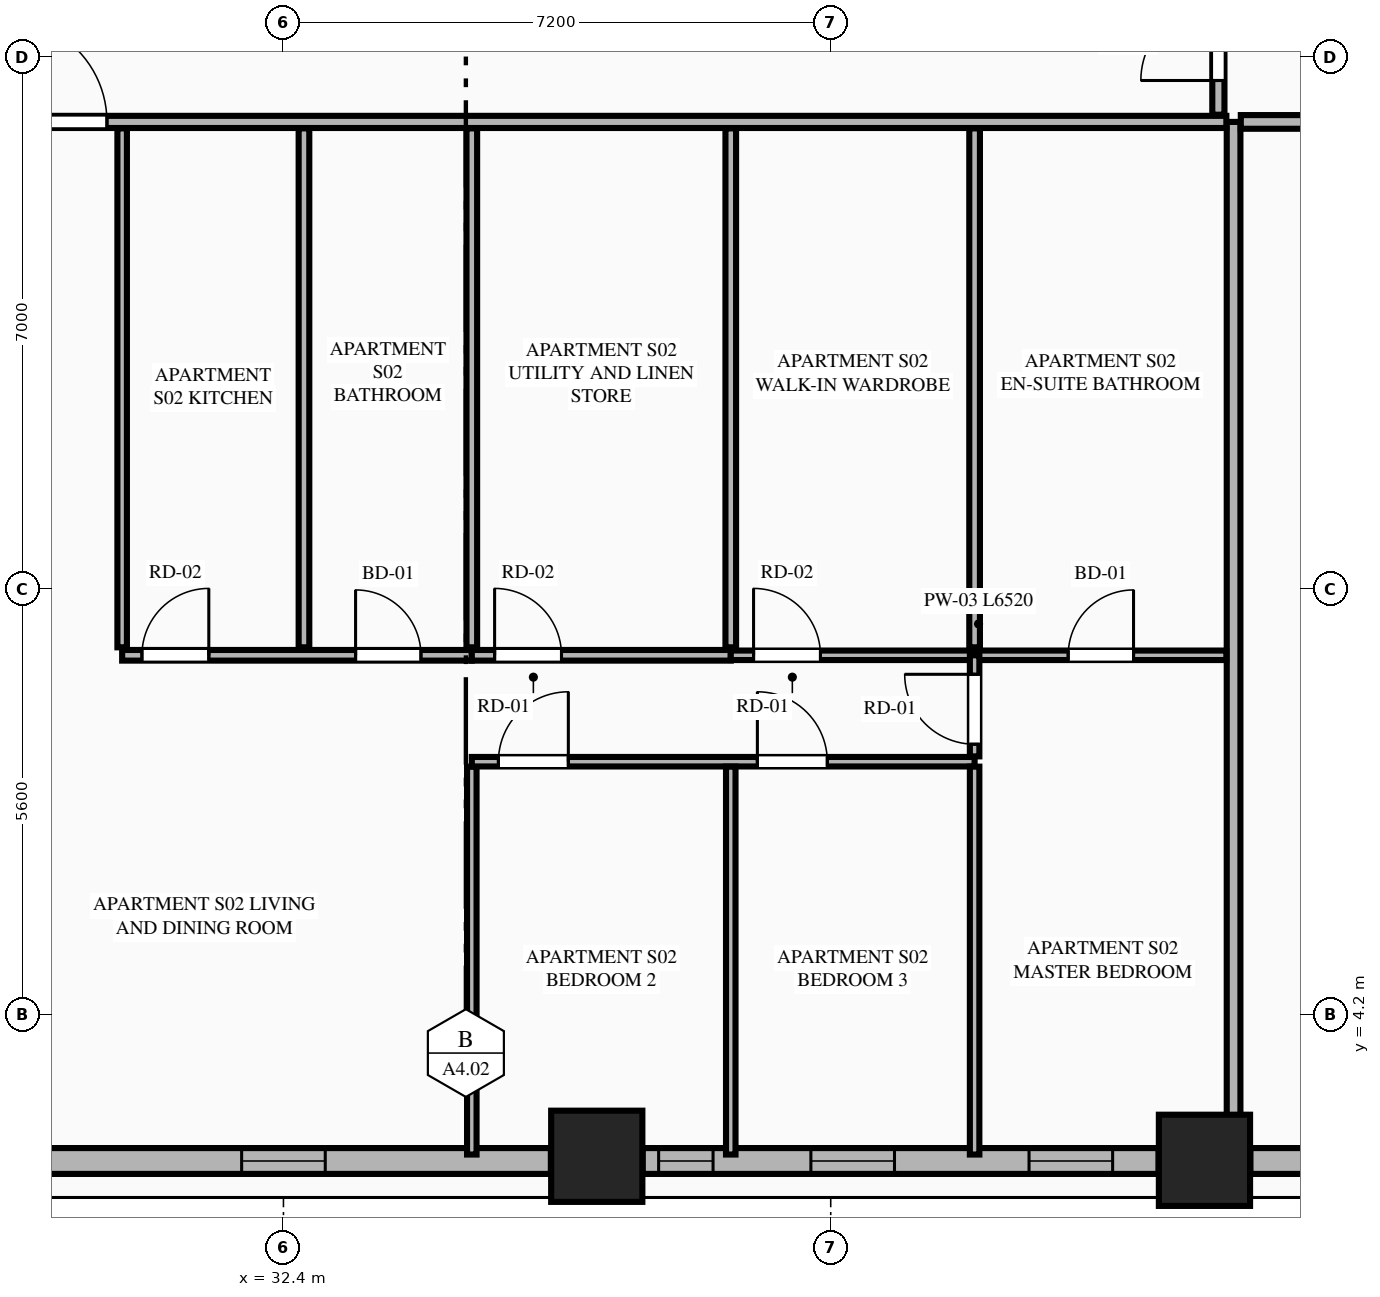
"""IFC4 building model, lengths in metres.
Left out: names, types, materials, properties, quantities, classifications, styles, units other than length and angle.
Written with IfcOpenShell. Run it as: python <this file> out.ifc"""

import sys

from ifc_helpers import new_model, si_unit, direction, frame, frame_2d, origin, origin_2d, place, context, subcontext, project, spatial, rectangle, extrude, element, fill, save


model = new_model("IFC4")
c1 = context("Model", 3, precision=1e-05, world=origin(), true_north=direction((0.0, 1.0)))
c2 = subcontext(c1, "Body", "Model", "MODEL_VIEW")
j1 = project(units=[si_unit("LENGTHUNIT", "METRE"), si_unit("PLANEANGLEUNIT", "RADIAN")], contexts=[c1])
p1 = place(None, origin())
s1 = spatial("IfcSite", under=j1, at=p1, CompositionType="ELEMENT")
p2 = place(p1, origin())
s2 = spatial("IfcBuilding", under=s1, at=p2, CompositionType="ELEMENT")
p3 = place(p2, frame((0.0, 0.0, 35.55)))
s3 = spatial("IfcBuildingStorey", under=s2, at=p3, CompositionType="ELEMENT", Elevation=35.55)
for number, where, z_axis, x_axis in (
    (1, (36.522, 2.342, 0.0), (0.0, 0.0, 1.0), (1.0, 0.0, 0.0)),
    (2, (44.517, 2.289, 0.0), (0.0, 0.0, 1.0), (1.0, 0.0, 0.0)),
):
    element("IfcColumn", number, at=place(p3, frame(where, z_axis=z_axis, x_axis=x_axis)), inside=s3, PredefinedType="COLUMN", context=c2, shape_type="SweptSolid", body=[
        extrude(rectangle(XDim=1.2, YDim=1.2, at=origin_2d()), origin(), (0.0, 0.0, 1.0), 3.55),
    ])
p4 = place(p3, frame((28.882, 2.28, 0.0), z_axis=(0.0, 0.0, 1.0), x_axis=(1.0, 0.0, 0.0)))
e3 = element("IfcWall", 3, at=p4, inside=s3, PredefinedType="STANDARD", context=c2, shape_type="SweptSolid", body=[
    extrude(rectangle(XDim=7.036, YDim=0.34, at=frame_2d((3.518, 0.0))), origin(), (0.0, 0.0, 1.0), 2.787),
])
p5 = place(p4, frame((2.968, 0.0, 0.75)))
e4 = element("IfcOpeningElement", 4, at=p5, cuts=e3, PredefinedType="OPENING", context=c2, shape_type="SweptSolid", body=[
    extrude(rectangle(XDim=1.1, YDim=1.887, at=frame_2d((0.55, 0.943))), frame((0.0, 0.18, 0.0), z_axis=(0.0, -1.0, 0.0), x_axis=(1.0, 0.0, 0.0)), (0.0, 0.0, 1.0), 0.36),
])
p6 = place(p3, frame((37.126, 2.28, 0.0), z_axis=(0.0, 0.0, 1.0), x_axis=(1.0, 0.0, 0.0)))
e5 = element("IfcWall", 5, at=p6, inside=s3, PredefinedType="STANDARD", context=c2, shape_type="SweptSolid", body=[
    extrude(rectangle(XDim=6.787, YDim=0.34, at=frame_2d((3.394, 0.0))), origin(), (0.0, 0.0, 1.0), 2.787),
])
p7 = place(p6, frame((2.213, 0.0, 0.75)))
e6 = element("IfcOpeningElement", 6, at=p7, cuts=e5, PredefinedType="OPENING", context=c2, shape_type="SweptSolid", body=[
    extrude(rectangle(XDim=1.1, YDim=1.887, at=frame_2d((0.55, 0.943))), frame((0.0, 0.18, 0.0), z_axis=(0.0, -1.0, 0.0), x_axis=(1.0, 0.0, 0.0)), (0.0, 0.0, 1.0), 0.36),
])
p8 = place(p6, frame((5.083, 0.0, 0.75)))
e7 = element("IfcOpeningElement", 7, at=p8, cuts=e5, PredefinedType="OPENING", context=c2, shape_type="SweptSolid", body=[
    extrude(rectangle(XDim=1.1, YDim=1.887, at=frame_2d((0.55, 0.943))), frame((0.0, 0.18, 0.0), z_axis=(0.0, -1.0, 0.0), x_axis=(1.0, 0.0, 0.0)), (0.0, 0.0, 1.0), 0.36),
])
p9 = place(p6, frame((0.21, 0.0, 0.75)))
e8 = element("IfcOpeningElement", 8, at=p9, cuts=e5, PredefinedType="OPENING", context=c2, shape_type="SweptSolid", body=[
    extrude(rectangle(XDim=0.716, YDim=1.887, at=frame_2d((0.358, 0.943))), frame((0.0, 0.18, 0.0), z_axis=(0.0, -1.0, 0.0), x_axis=(1.0, 0.0, 0.0)), (0.0, 0.0, 1.0), 0.36),
])
p10 = place(p3, frame((45.121, 2.28, 0.0), z_axis=(0.0, 0.0, 1.0), x_axis=(1.0, 0.0, 0.0)))
e9 = element("IfcWall", 9, at=p10, inside=s3, PredefinedType="STANDARD", context=c2, shape_type="SweptSolid", body=[
    extrude(rectangle(XDim=1.245, YDim=0.34, at=frame_2d((0.623, 0.0))), origin(), (0.0, 0.0, 1.0), 3.33),
])
p11 = place(p3, frame((44.9, 2.455, 0.0), z_axis=(0.0, 0.0, 1.0), x_axis=(0.0, 1.0, 0.0)))
e10 = element("IfcWall", 10, at=p11, inside=s3, PredefinedType="PARTITIONING", context=c2, shape_type="SweptSolid", body=[
    extrude(rectangle(XDim=13.495, YDim=0.18, at=frame_2d((6.748, 0.0))), origin(), (0.0, 0.0, 1.0), 3.33),
])
p12 = place(p3, frame((28.373, 15.95, 0.0), z_axis=(0.0, 0.0, 1.0), x_axis=(1.0, 0.0, 0.0)))
e11 = element("IfcWall", 11, at=p12, inside=s3, PredefinedType="PARTITIONING", context=c2, shape_type="SweptSolid", body=[
    extrude(rectangle(XDim=16.432, YDim=0.16, at=frame_2d((8.216, 0.0))), origin(), (0.0, 0.0, 1.0), 3.33),
])
p13 = place(p12, frame((0.355, 0.0, 0.0)))
e12 = element("IfcOpeningElement", 12, at=p13, cuts=e11, PredefinedType="OPENING", context=c2, shape_type="SweptSolid", body=[
    extrude(rectangle(XDim=1.35, YDim=2.35, at=frame_2d((0.675, 1.175))), frame((0.0, 0.09, 0.0), z_axis=(0.0, -1.0, 0.0), x_axis=(1.0, 0.0, 0.0)), (0.0, 0.0, 1.0), 0.18),
])
p14 = place(p3, frame((30.278, 9.038, 0.0), z_axis=(0.0, 0.0, 1.0), x_axis=(0.0, 1.0, 0.0)))
e13 = element("IfcWall", 13, at=p14, inside=s3, PredefinedType="PARTITIONING", context=c2, shape_type="SweptSolid", body=[
    extrude(rectangle(XDim=6.827, YDim=0.125, at=frame_2d((3.414, 0.0))), origin(), (0.0, 0.0, 1.0), 3.33),
])
p15 = place(p3, frame((30.278, 8.933, 0.0), z_axis=(0.0, 0.0, 1.0), x_axis=(1.0, 0.0, 0.0)))
e14 = element("IfcWall", 14, at=p15, inside=s3, PredefinedType="PLUMBINGWALL", context=c2, shape_type="SweptSolid", body=[
    extrude(rectangle(XDim=4.6, YDim=0.14, at=frame_2d((2.3, 0.0))), origin(), (0.0, 0.0, 1.0), 3.33),
])
p16 = place(p15, frame((3.071, 0.0, 0.0)))
e15 = element("IfcOpeningElement", 15, at=p16, cuts=e14, PredefinedType="OPENING", context=c2, shape_type="SweptSolid", body=[
    extrude(rectangle(XDim=0.86, YDim=2.1, at=frame_2d((0.43, 1.05))), frame((0.0, 0.08, 0.0), z_axis=(0.0, -1.0, 0.0), x_axis=(1.0, 0.0, 0.0)), (0.0, 0.0, 1.0), 0.16),
])
p17 = place(p15, frame((0.26, 0.0, 0.0)))
e16 = element("IfcOpeningElement", 16, at=p17, cuts=e14, PredefinedType="OPENING", context=c2, shape_type="SweptSolid", body=[
    extrude(rectangle(XDim=0.88, YDim=2.15, at=frame_2d((0.44, 1.075))), frame((0.0, 0.08, 0.0), z_axis=(0.0, -1.0, 0.0), x_axis=(1.0, 0.0, 0.0)), (0.0, 0.0, 1.0), 0.16),
])
p18 = place(p3, frame((34.878, 8.933, 0.0), z_axis=(0.0, 0.0, 1.0), x_axis=(1.0, 0.0, 0.0)))
e17 = element("IfcWall", 17, at=p18, inside=s3, PredefinedType="PLUMBINGWALL", context=c2, shape_type="SweptSolid", body=[
    extrude(rectangle(XDim=3.407, YDim=0.14, at=frame_2d((1.704, 0.0))), origin(), (0.0, 0.0, 1.0), 3.33),
])
p19 = place(p18, frame((0.3, 0.0, 0.0)))
e18 = element("IfcOpeningElement", 18, at=p19, cuts=e17, PredefinedType="OPENING", context=c2, shape_type="SweptSolid", body=[
    extrude(rectangle(XDim=0.88, YDim=2.15, at=frame_2d((0.44, 1.075))), frame((0.0, 0.08, 0.0), z_axis=(0.0, -1.0, 0.0), x_axis=(1.0, 0.0, 0.0)), (0.0, 0.0, 1.0), 0.16),
])
p20 = place(p3, frame((38.285, 8.933, 0.0), z_axis=(0.0, 0.0, 1.0), x_axis=(1.0, 0.0, 0.0)))
e19 = element("IfcWall", 19, at=p20, inside=s3, PredefinedType="PARTITIONING", context=c2, shape_type="SweptSolid", body=[
    extrude(rectangle(XDim=6.52, YDim=0.125, at=frame_2d((3.26, 0.0))), origin(), (0.0, 0.0, 1.0), 3.33),
])
p21 = place(p20, frame((4.439, 0.0, 0.0)))
e20 = element("IfcOpeningElement", 20, at=p21, cuts=e19, PredefinedType="OPENING", context=c2, shape_type="SweptSolid", body=[
    extrude(rectangle(XDim=0.86, YDim=2.1, at=frame_2d((0.43, 1.05))), frame((0.0, 0.073, 0.0), z_axis=(0.0, -1.0, 0.0), x_axis=(1.0, 0.0, 0.0)), (0.0, 0.0, 1.0), 0.145),
])
p22 = place(p20, frame((0.3, 0.0, 0.0)))
e21 = element("IfcOpeningElement", 21, at=p22, cuts=e19, PredefinedType="OPENING", context=c2, shape_type="SweptSolid", body=[
    extrude(rectangle(XDim=0.88, YDim=2.15, at=frame_2d((0.44, 1.075))), frame((0.0, 0.073, 0.0), z_axis=(0.0, -1.0, 0.0), x_axis=(1.0, 0.0, 0.0)), (0.0, 0.0, 1.0), 0.145),
])
p23 = place(p3, frame((32.67, 9.038, 0.0), z_axis=(0.0, 0.0, 1.0), x_axis=(0.0, 1.0, 0.0)))
e22 = element("IfcWall", 22, at=p23, inside=s3, PredefinedType="PLUMBINGWALL", context=c2, shape_type="SweptSolid", body=[
    extrude(rectangle(XDim=6.827, YDim=0.14, at=frame_2d((3.414, 0.0))), origin(), (0.0, 0.0, 1.0), 3.33),
])
p24 = place(p3, frame((34.878, 2.365, 0.0), z_axis=(0.0, 0.0, 1.0), x_axis=(0.0, 1.0, 0.0)))
e23 = element("IfcWall", 23, at=p24, inside=s3, PredefinedType="PARTITIONING", context=c2, shape_type="SweptSolid", body=[
    extrude(rectangle(XDim=5.103, YDim=0.125, at=frame_2d((2.552, 0.0))), origin(), (0.0, 0.0, 1.0), 3.33),
])
p25 = place(p3, frame((34.878, 7.533, 0.0), z_axis=(0.0, 0.0, 1.0), x_axis=(1.0, 0.0, 0.0)))
e24 = element("IfcWall", 24, at=p25, inside=s3, PredefinedType="PARTITIONING", context=c2, shape_type="SweptSolid", body=[
    extrude(rectangle(XDim=6.615, YDim=0.125, at=frame_2d((3.308, 0.0))), origin(), (0.0, 0.0, 1.0), 3.33),
])
p26 = place(p25, frame((0.35, 0.0, 0.0)))
e25 = element("IfcOpeningElement", 25, at=p26, cuts=e24, PredefinedType="OPENING", context=c2, shape_type="SweptSolid", body=[
    extrude(rectangle(XDim=0.92, YDim=2.15, at=frame_2d((0.46, 1.075))), frame((0.0, 0.073, 0.0), z_axis=(0.0, -1.0, 0.0), x_axis=(1.0, 0.0, 0.0)), (0.0, 0.0, 1.0), 0.145),
])
p27 = place(p25, frame((3.757, 0.0, 0.0)))
e26 = element("IfcOpeningElement", 26, at=p27, cuts=e24, PredefinedType="OPENING", context=c2, shape_type="SweptSolid", body=[
    extrude(rectangle(XDim=0.92, YDim=2.15, at=frame_2d((0.46, 1.075))), frame((0.0, 0.073, 0.0), z_axis=(0.0, -1.0, 0.0), x_axis=(1.0, 0.0, 0.0)), (0.0, 0.0, 1.0), 0.145),
])
p28 = place(p3, frame((41.493, 7.603, 0.0), z_axis=(0.0, 0.0, 1.0), x_axis=(0.0, 1.0, 0.0)))
e27 = element("IfcWall", 27, at=p28, inside=s3, PredefinedType="PARTITIONING", context=c2, shape_type="SweptSolid", body=[
    extrude(rectangle(XDim=1.33, YDim=0.125, at=frame_2d((0.665, 0.0))), origin(), (0.0, 0.0, 1.0), 3.33),
])
p29 = place(p28, frame((0.16, 0.0, 0.0)))
e28 = element("IfcOpeningElement", 28, at=p29, cuts=e27, PredefinedType="OPENING", context=c2, shape_type="SweptSolid", body=[
    extrude(rectangle(XDim=0.92, YDim=2.15, at=frame_2d((0.46, 1.075))), frame((0.0, 0.073, 0.0), z_axis=(0.0, -1.0, 0.0), x_axis=(1.0, 0.0, 0.0)), (0.0, 0.0, 1.0), 0.145),
])
for number, where, z_axis, x_axis in (
    (29, (34.878, 9.038, 0.0), (0.0, 0.0, 1.0), (0.0, 1.0, 0.0)),
    (30, (38.285, 9.038, 0.0), (0.0, 0.0, 1.0), (0.0, 1.0, 0.0)),
):
    element("IfcWall", number, at=place(p3, frame(where, z_axis=z_axis, x_axis=x_axis)), inside=s3, PredefinedType="PLUMBINGWALL", context=c2, shape_type="SweptSolid", body=[
        extrude(rectangle(XDim=6.827, YDim=0.14, at=frame_2d((3.414, 0.0))), origin(), (0.0, 0.0, 1.0), 3.33),
    ])
for number, where, z_axis, x_axis in (
    (31, (38.285, 2.365, 0.0), (0.0, 0.0, 1.0), (0.0, 1.0, 0.0)),
    (32, (41.493, 2.365, 0.0), (0.0, 0.0, 1.0), (0.0, 1.0, 0.0)),
):
    element("IfcWall", number, at=place(p3, frame(where, z_axis=z_axis, x_axis=x_axis)), inside=s3, PredefinedType="PARTITIONING", context=c2, shape_type="SweptSolid", body=[
        extrude(rectangle(XDim=5.103, YDim=0.125, at=frame_2d((2.552, 0.0))), origin(), (0.0, 0.0, 1.0), 3.33),
    ])
p30 = place(p3, frame((41.493, 9.038, 0.0), z_axis=(0.0, 0.0, 1.0), x_axis=(0.0, 1.0, 0.0)))
e33 = element("IfcWall", 33, at=p30, inside=s3, PredefinedType="PLUMBINGWALL", context=c2, shape_type="SweptSolid", body=[
    extrude(rectangle(XDim=6.827, YDim=0.14, at=frame_2d((3.414, 0.0))), origin(), (0.0, 0.0, 1.0), 3.33),
])
p31 = place(p3, frame((44.995, 15.95, 0.0), z_axis=(0.0, 0.0, 1.0), x_axis=(1.0, 0.0, 0.0)))
e34 = element("IfcWall", 34, at=p31, inside=s3, PredefinedType="PARTITIONING", context=c2, shape_type="SweptSolid", body=[
    extrude(rectangle(XDim=9.241, YDim=0.18, at=frame_2d((4.621, 0.0))), origin(), (0.0, 0.0, 1.0), 3.33),
])
p32 = place(p3, frame((44.7, 16.045, 0.0), z_axis=(0.0, 0.0, 1.0), x_axis=(0.0, 1.0, 0.0)))
e35 = element("IfcWall", 35, at=p32, inside=s3, PredefinedType="PARTITIONING", context=c2, shape_type="SweptSolid", body=[
    extrude(rectangle(XDim=19.71, YDim=0.16, at=frame_2d((9.855, 0.0))), origin(), (0.0, 0.0, 1.0), 2.7),
])
p33 = place(p32, frame((0.45, 0.0, 0.0)))
e36 = element("IfcOpeningElement", 36, at=p33, cuts=e35, PredefinedType="OPENING", context=c2, shape_type="SweptSolid", body=[
    extrude(rectangle(XDim=1.02, YDim=2.25, at=frame_2d((0.51, 1.125))), frame((0.0, 0.09, 0.0), z_axis=(0.0, -1.0, 0.0), x_axis=(1.0, 0.0, 0.0)), (0.0, 0.0, 1.0), 0.18),
])
p34 = place(p5, origin())
e37 = element("IfcWindow", 37, at=p34, inside=s3, PartitioningType="SINGLE_PANEL", PredefinedType="WINDOW", context=c2, shape_type="SweptSolid", body=[
    extrude(rectangle(XDim=1.1, YDim=1.887, at=frame_2d((0.55, 0.943))), frame((0.0, 0.03, 0.0), z_axis=(0.0, -1.0, 0.0), x_axis=(1.0, 0.0, 0.0)), (0.0, 0.0, 1.0), 0.06),
])
fill(e4, e37)
p35 = place(p7, origin())
e38 = element("IfcWindow", 38, at=p35, inside=s3, PartitioningType="SINGLE_PANEL", PredefinedType="WINDOW", context=c2, shape_type="SweptSolid", body=[
    extrude(rectangle(XDim=1.1, YDim=1.887, at=frame_2d((0.55, 0.943))), frame((0.0, 0.03, 0.0), z_axis=(0.0, -1.0, 0.0), x_axis=(1.0, 0.0, 0.0)), (0.0, 0.0, 1.0), 0.06),
])
fill(e6, e38)
p36 = place(p16, origin())
e39 = element("IfcDoor", 39, at=p36, inside=s3, OperationType="SINGLE_SWING_LEFT", PredefinedType="DOOR", context=c2, shape_type="SweptSolid", body=[
    extrude(rectangle(XDim=0.86, YDim=2.1, at=frame_2d((0.43, 1.05))), frame((0.0, 0.025, 0.0), z_axis=(0.0, -1.0, 0.0), x_axis=(1.0, 0.0, 0.0)), (0.0, 0.0, 1.0), 0.05),
])
fill(e15, e39)
p37 = place(p21, origin())
e40 = element("IfcDoor", 40, at=p37, inside=s3, OperationType="SINGLE_SWING_RIGHT", PredefinedType="DOOR", context=c2, shape_type="SweptSolid", body=[
    extrude(rectangle(XDim=0.86, YDim=2.1, at=frame_2d((0.43, 1.05))), frame((0.0, 0.025, 0.0), z_axis=(0.0, -1.0, 0.0), x_axis=(1.0, 0.0, 0.0)), (0.0, 0.0, 1.0), 0.05),
])
fill(e20, e40)
p38 = place(p13, origin())
e41 = element("IfcDoor", 41, at=p38, inside=s3, OperationType="SINGLE_SWING_LEFT", PredefinedType="DOOR", context=c2, shape_type="SweptSolid", body=[
    extrude(rectangle(XDim=1.35, YDim=2.35, at=frame_2d((0.675, 1.175))), frame((0.0, 0.025, 0.0), z_axis=(0.0, -1.0, 0.0), x_axis=(1.0, 0.0, 0.0)), (0.0, 0.0, 1.0), 0.05),
])
fill(e12, e41)
p39 = place(p17, origin())
e42 = element("IfcDoor", 42, at=p39, inside=s3, OperationType="SINGLE_SWING_RIGHT", PredefinedType="DOOR", context=c2, shape_type="SweptSolid", body=[
    extrude(rectangle(XDim=0.88, YDim=2.15, at=frame_2d((0.44, 1.075))), frame((0.0, 0.025, 0.0), z_axis=(0.0, -1.0, 0.0), x_axis=(1.0, 0.0, 0.0)), (0.0, 0.0, 1.0), 0.05),
])
fill(e16, e42)
p40 = place(p19, origin())
e43 = element("IfcDoor", 43, at=p40, inside=s3, OperationType="SINGLE_SWING_LEFT", PredefinedType="DOOR", context=c2, shape_type="SweptSolid", body=[
    extrude(rectangle(XDim=0.88, YDim=2.15, at=frame_2d((0.44, 1.075))), frame((0.0, 0.025, 0.0), z_axis=(0.0, -1.0, 0.0), x_axis=(1.0, 0.0, 0.0)), (0.0, 0.0, 1.0), 0.05),
])
fill(e18, e43)
p41 = place(p26, origin())
e44 = element("IfcDoor", 44, at=p41, inside=s3, OperationType="SINGLE_SWING_RIGHT", PredefinedType="DOOR", context=c2, shape_type="SweptSolid", body=[
    extrude(rectangle(XDim=0.92, YDim=2.15, at=frame_2d((0.46, 1.075))), frame((0.0, 0.025, 0.0), z_axis=(0.0, -1.0, 0.0), x_axis=(1.0, 0.0, 0.0)), (0.0, 0.0, 1.0), 0.05),
])
fill(e25, e44)
p42 = place(p27, origin())
e45 = element("IfcDoor", 45, at=p42, inside=s3, OperationType="SINGLE_SWING_LEFT", PredefinedType="DOOR", context=c2, shape_type="SweptSolid", body=[
    extrude(rectangle(XDim=0.92, YDim=2.15, at=frame_2d((0.46, 1.075))), frame((0.0, 0.025, 0.0), z_axis=(0.0, -1.0, 0.0), x_axis=(1.0, 0.0, 0.0)), (0.0, 0.0, 1.0), 0.05),
])
fill(e26, e45)
p43 = place(p29, origin())
e46 = element("IfcDoor", 46, at=p43, inside=s3, OperationType="SINGLE_SWING_RIGHT", PredefinedType="DOOR", context=c2, shape_type="SweptSolid", body=[
    extrude(rectangle(XDim=0.92, YDim=2.15, at=frame_2d((0.46, 1.075))), frame((0.0, 0.025, 0.0), z_axis=(0.0, -1.0, 0.0), x_axis=(1.0, 0.0, 0.0)), (0.0, 0.0, 1.0), 0.05),
])
fill(e28, e46)
p44 = place(p22, origin())
e47 = element("IfcDoor", 47, at=p44, inside=s3, OperationType="SINGLE_SWING_LEFT", PredefinedType="DOOR", context=c2, shape_type="SweptSolid", body=[
    extrude(rectangle(XDim=0.88, YDim=2.15, at=frame_2d((0.44, 1.075))), frame((0.0, 0.025, 0.0), z_axis=(0.0, -1.0, 0.0), x_axis=(1.0, 0.0, 0.0)), (0.0, 0.0, 1.0), 0.05),
])
fill(e21, e47)
p45 = place(p33, origin())
e48 = element("IfcDoor", 48, at=p45, inside=s3, OperationType="SINGLE_SWING_LEFT", PredefinedType="DOOR", context=c2, shape_type="SweptSolid", body=[
    extrude(rectangle(XDim=1.02, YDim=2.25, at=frame_2d((0.51, 1.125))), frame((0.0, 0.025, 0.0), z_axis=(0.0, -1.0, 0.0), x_axis=(1.0, 0.0, 0.0)), (0.0, 0.0, 1.0), 0.05),
])
fill(e36, e48)
p46 = place(p8, origin())
e49 = element("IfcWindow", 49, at=p46, inside=s3, PartitioningType="SINGLE_PANEL", PredefinedType="WINDOW", context=c2, shape_type="SweptSolid", body=[
    extrude(rectangle(XDim=1.1, YDim=1.887, at=frame_2d((0.55, 0.943))), frame((0.0, 0.03, 0.0), z_axis=(0.0, -1.0, 0.0), x_axis=(1.0, 0.0, 0.0)), (0.0, 0.0, 1.0), 0.06),
])
fill(e7, e49)
p47 = place(p9, origin())
e50 = element("IfcWindow", 50, at=p47, inside=s3, PartitioningType="SINGLE_PANEL", PredefinedType="WINDOW", context=c2, shape_type="SweptSolid", body=[
    extrude(rectangle(XDim=0.716, YDim=1.887, at=frame_2d((0.358, 0.943))), frame((0.0, 0.03, 0.0), z_axis=(0.0, -1.0, 0.0), x_axis=(1.0, 0.0, 0.0)), (0.0, 0.0, 1.0), 0.06),
])
fill(e8, e50)
save(model, sys.argv[1])
